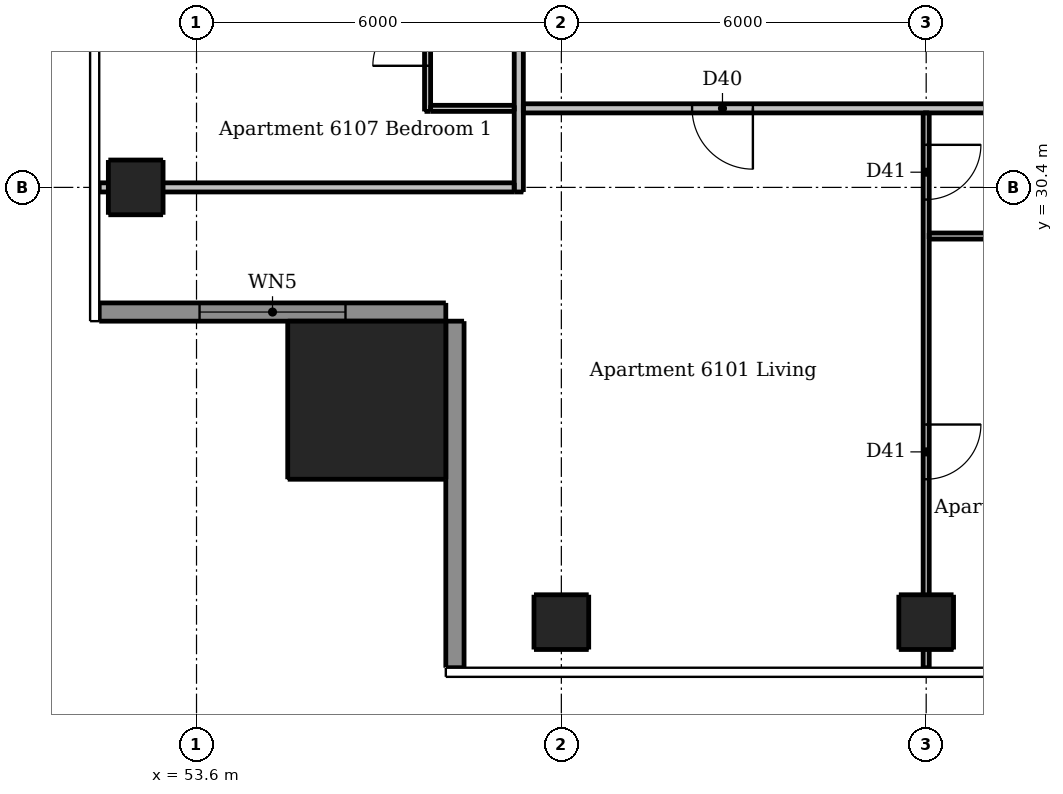
"""IFC4 building model, lengths in metres.
Left out: names, types, materials, properties, quantities, classifications, styles, units other than length and angle.
Written with IfcOpenShell. Run it as: python <this file> out.ifc"""

import sys

from ifc_helpers import new_model, si_unit, direction, frame, frame_2d, origin, origin_2d, place, context, subcontext, project, spatial, rectangle, extrude, element, fill, save


model = new_model("IFC4")
c1 = context("Model", 3, precision=1e-05, world=origin(), true_north=direction((0.0, 1.0)))
c2 = subcontext(c1, "Body", "Model", "MODEL_VIEW")
j1 = project(units=[si_unit("LENGTHUNIT", "METRE"), si_unit("PLANEANGLEUNIT", "RADIAN")], contexts=[c1])
p1 = place(None, origin())
s1 = spatial("IfcSite", under=j1, at=p1, CompositionType="ELEMENT")
p2 = place(p1, origin())
s2 = spatial("IfcBuilding", under=s1, at=p2, CompositionType="ELEMENT")
p3 = place(p2, frame((0.0, 0.0, 226.6)))
s3 = spatial("IfcBuildingStorey", under=s2, at=p3, CompositionType="ELEMENT", Elevation=226.6)
for number, where, z_axis, x_axis in (
    (1, (59.6, 23.25, 0.0), (0.0, 0.0, 1.0), (1.0, 0.0, 0.0)),
    (2, (65.6, 23.25, 0.0), (0.0, 0.0, 1.0), (1.0, 0.0, 0.0)),
    (3, (52.6, 30.4, 0.0), (0.0, 0.0, 1.0), (1.0, 0.0, 0.0)),
):
    element("IfcColumn", number, at=place(p3, frame(where, z_axis=z_axis, x_axis=x_axis)), inside=s3, PredefinedType="COLUMN", context=c2, shape_type="SweptSolid", body=[
        extrude(rectangle(XDim=0.9, YDim=0.9, at=origin_2d()), origin(), (0.0, 0.0, 1.0), 2.95),
    ])
p4 = place(p3, frame((56.4, 26.9, 0.0), z_axis=(0.0, 0.0, 1.0), x_axis=(1.0, 0.0, 0.0)))
e4 = element("IfcColumn", 4, at=p4, inside=s3, PredefinedType="COLUMN", context=c2, shape_type="SweptSolid", body=[
    extrude(rectangle(XDim=2.6, YDim=2.6, at=origin_2d()), origin(), (0.0, 0.0, 1.0), 3.3),
])
p5 = place(p3, frame((52.0, 28.35, 0.0), z_axis=(0.0, 0.0, 1.0), x_axis=(1.0, 0.0, 0.0)))
e5 = element("IfcWall", 5, at=p5, inside=s3, PredefinedType="SOLIDWALL", context=c2, shape_type="SweptSolid", body=[
    extrude(rectangle(XDim=5.7, YDim=0.3, at=frame_2d((2.85, 0.0))), origin(), (0.0, 0.0, 1.0), 2.95),
])
p6 = place(p5, frame((1.65, 0.0, 0.15)))
e6 = element("IfcOpeningElement", 6, at=p6, cuts=e5, PredefinedType="OPENING", context=c2, shape_type="SweptSolid", body=[
    extrude(rectangle(XDim=2.4, YDim=2.1, at=frame_2d((1.2, 1.05))), frame((0.0, 0.16, 0.0), z_axis=(0.0, -1.0, 0.0), x_axis=(1.0, 0.0, 0.0)), (0.0, 0.0, 1.0), 0.32),
])
p7 = place(p3, frame((57.85, 28.2, 0.0), z_axis=(0.0, 0.0, 1.0), x_axis=(0.0, -1.0, 0.0)))
e7 = element("IfcWall", 7, at=p7, inside=s3, PredefinedType="SOLIDWALL", context=c2, shape_type="SweptSolid", body=[
    extrude(rectangle(XDim=5.7, YDim=0.3, at=frame_2d((2.85, 0.0))), origin(), (0.0, 0.0, 1.0), 2.95),
])
p8 = place(p3, frame((57.4, 31.65, 0.0), z_axis=(0.0, 0.0, 1.0), x_axis=(0.0, 1.0, 0.0)))
e8 = element("IfcWall", 8, at=p8, inside=s3, PredefinedType="PARTITIONING", context=c2, shape_type="SweptSolid", body=[
    extrude(rectangle(XDim=16.675, YDim=0.1, at=frame_2d((8.337, 0.0))), origin(), (0.0, 0.0, 1.0), 2.95),
])
p9 = place(p8, frame((9.7, 0.0, 0.0)))
e9 = element("IfcOpeningElement", 9, at=p9, cuts=e8, PredefinedType="OPENING", context=c2, shape_type="SweptSolid", body=[
    extrude(rectangle(XDim=0.9, YDim=2.1, at=frame_2d((0.45, 1.05))), frame((0.0, 0.06, 0.0), z_axis=(0.0, -1.0, 0.0), x_axis=(1.0, 0.0, 0.0)), (0.0, 0.0, 1.0), 0.12),
])
p10 = place(p8, frame((14.8, 0.0, 0.0)))
e10 = element("IfcOpeningElement", 10, at=p10, cuts=e8, PredefinedType="OPENING", context=c2, shape_type="SweptSolid", body=[
    extrude(rectangle(XDim=0.9, YDim=2.1, at=frame_2d((0.45, 1.05))), frame((0.0, 0.06, 0.0), z_axis=(0.0, -1.0, 0.0), x_axis=(1.0, 0.0, 0.0)), (0.0, 0.0, 1.0), 0.12),
])
p11 = place(p8, frame((5.25, 0.0, 0.0)))
e11 = element("IfcOpeningElement", 11, at=p11, cuts=e8, PredefinedType="OPENING", context=c2, shape_type="SweptSolid", body=[
    extrude(rectangle(XDim=0.8, YDim=2.1, at=frame_2d((0.4, 1.05))), frame((0.0, 0.06, 0.0), z_axis=(0.0, -1.0, 0.0), x_axis=(1.0, 0.0, 0.0)), (0.0, 0.0, 1.0), 0.12),
])
p12 = place(p8, frame((0.75, 0.0, 0.0)))
e12 = element("IfcOpeningElement", 12, at=p12, cuts=e8, PredefinedType="OPENING", context=c2, shape_type="SweptSolid", body=[
    extrude(rectangle(XDim=0.9, YDim=2.1, at=frame_2d((0.45, 1.05))), frame((0.0, 0.06, 0.0), z_axis=(0.0, -1.0, 0.0), x_axis=(1.0, 0.0, 0.0)), (0.0, 0.0, 1.0), 0.12),
])
p13 = place(p8, frame((3.15, 0.0, 0.0)))
e13 = element("IfcOpeningElement", 13, at=p13, cuts=e8, PredefinedType="OPENING", context=c2, shape_type="SweptSolid", body=[
    extrude(rectangle(XDim=0.8, YDim=2.1, at=frame_2d((0.4, 1.05))), frame((0.0, 0.06, 0.0), z_axis=(0.0, -1.0, 0.0), x_axis=(1.0, 0.0, 0.0)), (0.0, 0.0, 1.0), 0.12),
])
p14 = place(p3, frame((65.6, 31.625, 0.0), z_axis=(0.0, 0.0, 1.0), x_axis=(0.0, -1.0, 0.0)))
e14 = element("IfcWall", 14, at=p14, inside=s3, PredefinedType="PARTITIONING", context=c2, shape_type="SweptSolid", body=[
    extrude(rectangle(XDim=9.125, YDim=0.1, at=frame_2d((4.562, 0.0))), origin(), (0.0, 0.0, 1.0), 2.332),
])
p15 = place(p14, frame((0.525, 0.0, 0.0)))
e15 = element("IfcOpeningElement", 15, at=p15, cuts=e14, PredefinedType="OPENING", context=c2, shape_type="SweptSolid", body=[
    extrude(rectangle(XDim=0.9, YDim=2.1, at=frame_2d((0.45, 1.05))), frame((0.0, 0.06, 0.0), z_axis=(0.0, -1.0, 0.0), x_axis=(1.0, 0.0, 0.0)), (0.0, 0.0, 1.0), 0.12),
])
p16 = place(p14, frame((5.125, 0.0, 0.0)))
e16 = element("IfcOpeningElement", 16, at=p16, cuts=e14, PredefinedType="OPENING", context=c2, shape_type="SweptSolid", body=[
    extrude(rectangle(XDim=0.9, YDim=2.1, at=frame_2d((0.45, 1.05))), frame((0.0, 0.06, 0.0), z_axis=(0.0, -1.0, 0.0), x_axis=(1.0, 0.0, 0.0)), (0.0, 0.0, 1.0), 0.12),
])
p17 = place(p3, frame((57.45, 31.7, 0.0), z_axis=(0.0, 0.0, 1.0), x_axis=(1.0, 0.0, 0.0)))
e17 = element("IfcWall", 17, at=p17, inside=s3, PredefinedType="PARTITIONING", context=c2, shape_type="SweptSolid", body=[
    extrude(rectangle(XDim=1.375, YDim=0.1, at=frame_2d((0.688, 0.0))), origin(), (0.0, 0.0, 1.0), 2.95),
])
p18 = place(p3, frame((65.65, 29.6, 0.0), z_axis=(0.0, 0.0, 1.0), x_axis=(1.0, 0.0, 0.0)))
e18 = element("IfcWall", 18, at=p18, inside=s3, PredefinedType="PARTITIONING", context=c2, shape_type="SweptSolid", body=[
    extrude(rectangle(XDim=5.875, YDim=0.1, at=frame_2d((2.938, 0.0))), origin(), (0.0, 0.0, 1.0), 2.95),
])
p19 = place(p18, frame((3.75, 0.0, 0.0)))
e19 = element("IfcOpeningElement", 19, at=p19, cuts=e18, PredefinedType="OPENING", context=c2, shape_type="SweptSolid", body=[
    extrude(rectangle(XDim=0.8, YDim=2.1, at=frame_2d((0.4, 1.05))), frame((0.0, 0.06, 0.0), z_axis=(0.0, -1.0, 0.0), x_axis=(1.0, 0.0, 0.0)), (0.0, 0.0, 1.0), 0.12),
])
p20 = place(p3, frame((58.9, 30.325, 0.0), z_axis=(0.0, 0.0, 1.0), x_axis=(0.0, 1.0, 0.0)))
e20 = element("IfcWall", 20, at=p20, inside=s3, PredefinedType="PARTITIONING", context=c2, shape_type="SweptSolid", body=[
    extrude(rectangle(XDim=30.85, YDim=0.15, at=frame_2d((15.425, 0.0))), origin(), (0.0, 0.0, 1.0), 2.95),
])
p21 = place(p20, frame((9.225, 0.0, 0.0)))
e21 = element("IfcOpeningElement", 21, at=p21, cuts=e20, PredefinedType="OPENING", context=c2, shape_type="SweptSolid", body=[
    extrude(rectangle(XDim=1.0, YDim=2.1, at=frame_2d((0.5, 1.05))), frame((0.0, 0.085, 0.0), z_axis=(0.0, -1.0, 0.0), x_axis=(1.0, 0.0, 0.0)), (0.0, 0.0, 1.0), 0.17),
])
p22 = place(p20, frame((26.925, 0.0, 0.0)))
e22 = element("IfcOpeningElement", 22, at=p22, cuts=e20, PredefinedType="OPENING", context=c2, shape_type="SweptSolid", body=[
    extrude(rectangle(XDim=1.0, YDim=2.1, at=frame_2d((0.5, 1.05))), frame((0.0, 0.085, 0.0), z_axis=(0.0, -1.0, 0.0), x_axis=(1.0, 0.0, 0.0)), (0.0, 0.0, 1.0), 0.17),
])
p23 = place(p3, frame((89.525, 31.7, 0.0), z_axis=(0.0, 0.0, 1.0), x_axis=(-1.0, 0.0, 0.0)))
e23 = element("IfcWall", 23, at=p23, inside=s3, PredefinedType="PARTITIONING", context=c2, shape_type="SweptSolid", body=[
    extrude(rectangle(XDim=30.55, YDim=0.15, at=frame_2d((15.275, 0.0))), origin(), (0.0, 0.0, 1.0), 2.95),
])
p24 = place(p23, frame((26.775, 0.0, 0.0)))
e24 = element("IfcOpeningElement", 24, at=p24, cuts=e23, PredefinedType="OPENING", context=c2, shape_type="SweptSolid", body=[
    extrude(rectangle(XDim=1.0, YDim=2.1, at=frame_2d((0.5, 1.05))), frame((0.0, 0.085, 0.0), z_axis=(0.0, -1.0, 0.0), x_axis=(1.0, 0.0, 0.0)), (0.0, 0.0, 1.0), 0.17),
])
p25 = place(p23, frame((9.075, 0.0, 0.0)))
e25 = element("IfcOpeningElement", 25, at=p25, cuts=e23, PredefinedType="OPENING", context=c2, shape_type="SweptSolid", body=[
    extrude(rectangle(XDim=1.0, YDim=2.1, at=frame_2d((0.5, 1.05))), frame((0.0, 0.085, 0.0), z_axis=(0.0, -1.0, 0.0), x_axis=(1.0, 0.0, 0.0)), (0.0, 0.0, 1.0), 0.17),
])
p26 = place(p3, frame((52.0, 30.4, 0.0), z_axis=(0.0, 0.0, 1.0), x_axis=(1.0, 0.0, 0.0)))
e26 = element("IfcWall", 26, at=p26, inside=s3, PredefinedType="PARTITIONING", context=c2, shape_type="SweptSolid", body=[
    extrude(rectangle(XDim=6.825, YDim=0.15, at=frame_2d((3.413, 0.0))), origin(), (0.0, 0.0, 1.0), 2.332),
])
p27 = place(p6, origin())
e27 = element("IfcWindow", 27, at=p27, inside=s3, PartitioningType="DOUBLE_PANEL_VERTICAL", PredefinedType="WINDOW", context=c2, shape_type="SweptSolid", body=[
    extrude(rectangle(XDim=2.4, YDim=2.1, at=frame_2d((1.2, 1.05))), frame((0.0, 0.03, 0.0), z_axis=(0.0, -1.0, 0.0), x_axis=(1.0, 0.0, 0.0)), (0.0, 0.0, 1.0), 0.06),
])
fill(e6, e27)
p28 = place(p24, origin())
e28 = element("IfcDoor", 28, at=p28, inside=s3, OperationType="SINGLE_SWING_LEFT", PredefinedType="DOOR", context=c2, shape_type="SweptSolid", body=[
    extrude(rectangle(XDim=1.0, YDim=2.1, at=frame_2d((0.5, 1.05))), frame((0.0, 0.025, 0.0), z_axis=(0.0, -1.0, 0.0), x_axis=(1.0, 0.0, 0.0)), (0.0, 0.0, 1.0), 0.05),
])
fill(e24, e28)
p29 = place(p15, origin())
e29 = element("IfcDoor", 29, at=p29, inside=s3, OperationType="SINGLE_SWING_LEFT", PredefinedType="DOOR", context=c2, shape_type="SweptSolid", body=[
    extrude(rectangle(XDim=0.9, YDim=2.1, at=frame_2d((0.45, 1.05))), frame((0.0, 0.025, 0.0), z_axis=(0.0, -1.0, 0.0), x_axis=(1.0, 0.0, 0.0)), (0.0, 0.0, 1.0), 0.05),
])
fill(e15, e29)
p30 = place(p16, origin())
e30 = element("IfcDoor", 30, at=p30, inside=s3, OperationType="SINGLE_SWING_LEFT", PredefinedType="DOOR", context=c2, shape_type="SweptSolid", body=[
    extrude(rectangle(XDim=0.9, YDim=2.1, at=frame_2d((0.45, 1.05))), frame((0.0, 0.025, 0.0), z_axis=(0.0, -1.0, 0.0), x_axis=(1.0, 0.0, 0.0)), (0.0, 0.0, 1.0), 0.05),
])
fill(e16, e30)
p31 = place(p12, origin())
e31 = element("IfcDoor", 31, at=p31, inside=s3, OperationType="SINGLE_SWING_LEFT", PredefinedType="DOOR", context=c2, shape_type="SweptSolid", body=[
    extrude(rectangle(XDim=0.9, YDim=2.1, at=frame_2d((0.45, 1.05))), frame((0.0, 0.025, 0.0), z_axis=(0.0, -1.0, 0.0), x_axis=(1.0, 0.0, 0.0)), (0.0, 0.0, 1.0), 0.05),
])
fill(e12, e31)
save(model, sys.argv[1])
